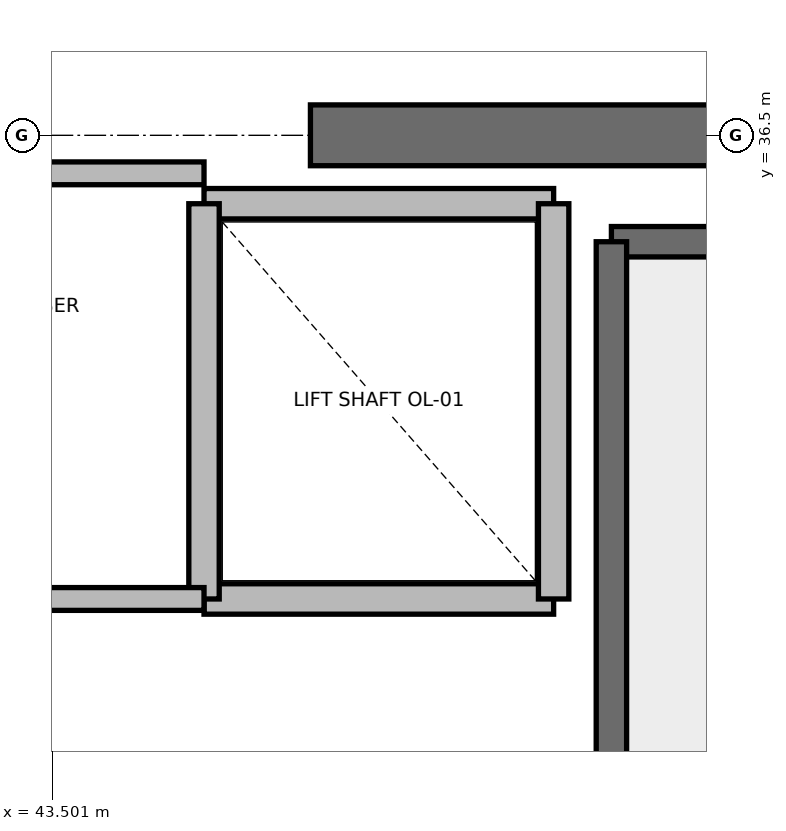
"""IFC4 building model, lengths in metres.
Left out: names, types, materials, properties, quantities, classifications, styles, units other than length and angle.
Written with IfcOpenShell. Run it as: python <this file> out.ifc"""

import sys

from ifc_helpers import new_model, si_unit, direction, frame, frame_2d, origin, place, context, subcontext, project, spatial, rectangle, extrude, element, save


model = new_model("IFC4")
c1 = context("Model", 3, precision=1e-05, world=origin(), true_north=direction((0.0, 1.0)))
c2 = subcontext(c1, "Body", "Model", "MODEL_VIEW")
j1 = project(units=[si_unit("LENGTHUNIT", "METRE"), si_unit("PLANEANGLEUNIT", "RADIAN")], contexts=[c1])
p1 = place(None, origin())
s1 = spatial("IfcSite", under=j1, at=p1, CompositionType="ELEMENT")
p2 = place(p1, origin())
s2 = spatial("IfcBuilding", under=s1, at=p2, CompositionType="ELEMENT")
p3 = place(p2, frame((0.0, 0.0, 338.8)))
s3 = spatial("IfcBuildingStorey", under=s2, at=p3, CompositionType="ELEMENT", Elevation=338.8)
p4 = place(p3, frame((45.2, 36.5, 0.0), z_axis=(0.0, 0.0, 1.0), x_axis=(1.0, 0.0, 0.0)))
e1 = element("IfcWall", 1, at=p4, inside=s3, PredefinedType="SHEAR", context=c2, shape_type="SweptSolid", body=[
    extrude(rectangle(XDim=5.8, YDim=0.4, at=frame_2d((2.9, 0.0))), origin(), (0.0, 0.0, 1.0), 3.7),
])
p5 = place(p3, frame((47.18, 35.8, 0.0), z_axis=(0.0, 0.0, 1.0), x_axis=(1.0, 0.0, 0.0)))
e2 = element("IfcWall", 2, at=p5, inside=s3, PredefinedType="SOLIDWALL", context=c2, shape_type="SweptSolid", body=[
    extrude(rectangle(XDim=3.12, YDim=0.2, at=frame_2d((1.56, 0.0))), origin(), (0.0, 0.0, 1.0), 3.7),
])
p6 = place(p3, frame((47.18, 27.62, 0.0), z_axis=(0.0, 0.0, 1.0), x_axis=(0.0, 1.0, 0.0)))
e3 = element("IfcWall", 3, at=p6, inside=s3, PredefinedType="SOLIDWALL", context=c2, shape_type="SweptSolid", body=[
    extrude(rectangle(XDim=8.18, YDim=0.2, at=frame_2d((4.09, 0.0))), origin(), (0.0, 0.0, 1.0), 3.7),
])
p7 = place(p3, frame((44.5, 33.45, 0.0), z_axis=(0.0, 0.0, 1.0), x_axis=(1.0, 0.0, 0.0)))
e4 = element("IfcWall", 4, at=p7, inside=s3, PredefinedType="SOLIDWALL", context=c2, shape_type="SweptSolid", body=[
    extrude(rectangle(XDim=2.3, YDim=0.2, at=frame_2d((1.15, 0.0))), origin(), (0.0, 0.0, 1.0), 3.7),
])
p8 = place(p3, frame((46.8, 36.05, 0.0), z_axis=(0.0, 0.0, 1.0), x_axis=(-1.0, 0.0, 0.0)))
e5 = element("IfcWall", 5, at=p8, inside=s3, PredefinedType="SOLIDWALL", context=c2, shape_type="SweptSolid", body=[
    extrude(rectangle(XDim=2.3, YDim=0.2, at=frame_2d((1.15, 0.0))), origin(), (0.0, 0.0, 1.0), 2.78),
])
p9 = place(p3, frame((44.5, 36.05, 0.0), z_axis=(0.0, 0.0, 1.0), x_axis=(0.0, -1.0, 0.0)))
e6 = element("IfcWall", 6, at=p9, inside=s3, PredefinedType="SOLIDWALL", context=c2, shape_type="SweptSolid", body=[
    extrude(rectangle(XDim=2.6, YDim=0.2, at=frame_2d((1.3, 0.0))), origin(), (0.0, 0.0, 1.0), 2.78),
])
p10 = place(p3, frame((46.8, 33.45, 0.0), z_axis=(0.0, 0.0, 1.0), x_axis=(0.0, 1.0, 0.0)))
e7 = element("IfcWall", 7, at=p10, inside=s3, PredefinedType="SOLIDWALL", context=c2, shape_type="SweptSolid", body=[
    extrude(rectangle(XDim=2.6, YDim=0.2, at=frame_2d((1.3, 0.0))), origin(), (0.0, 0.0, 1.0), 3.7),
])
p11 = place(p3, frame((41.56, 36.25, 0.0), z_axis=(0.0, 0.0, 1.0), x_axis=(1.0, 0.0, 0.0)))
e8 = element("IfcWall", 8, at=p11, inside=s3, PredefinedType="PARTITIONING", context=c2, shape_type="SweptSolid", body=[
    extrude(rectangle(XDim=2.94, YDim=0.15, at=frame_2d((1.47, 0.0))), origin(), (0.0, 0.0, 1.0), 2.78),
])
p12 = place(p3, frame((41.56, 33.45, 0.0), z_axis=(0.0, 0.0, 1.0), x_axis=(1.0, 0.0, 0.0)))
e9 = element("IfcWall", 9, at=p12, inside=s3, PredefinedType="PARTITIONING", context=c2, shape_type="SweptSolid", body=[
    extrude(rectangle(XDim=2.94, YDim=0.15, at=frame_2d((1.47, 0.0))), origin(), (0.0, 0.0, 1.0), 2.85),
])
p13 = place(p12, frame((1.03, 0.0, 0.0)))
e10 = element("IfcOpeningElement", 10, at=p13, cuts=e9, PredefinedType="OPENING", context=c2, shape_type="SweptSolid", body=[
    extrude(rectangle(XDim=0.88, YDim=2.1, at=frame_2d((0.44, 1.05))), frame((0.0, 0.075, 0.0), z_axis=(0.0, -1.0, 0.0), x_axis=(1.0, 0.0, 0.0)), (0.0, 0.0, 1.0), 0.15),
])
save(model, sys.argv[1])
